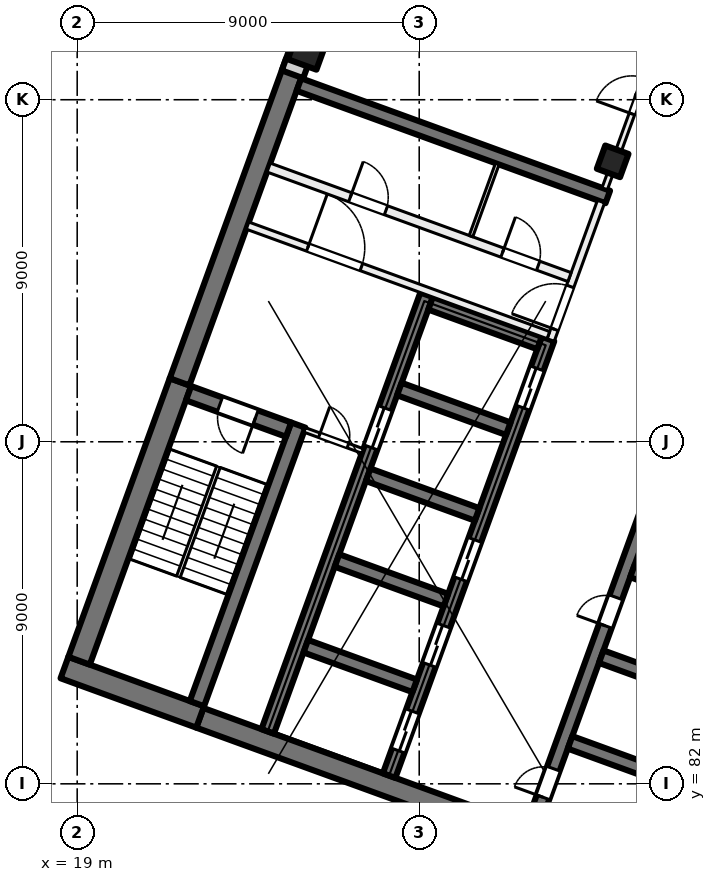
"""IFC4 building model, lengths in metres.
Left out: names, types, materials, properties, quantities, classifications, styles, units other than length and angle.
Written with IfcOpenShell. Run it as: python <this file> out.ifc"""

import sys

from ifc_helpers import new_model, si_unit, direction, frame, frame_2d, origin, origin_2d, place, context, subcontext, project, spatial, rectangle, extrude, element, fill, save


model = new_model("IFC4")
c1 = context("Model", 3, precision=1e-05, world=origin(), true_north=direction((0.0, 1.0)))
c2 = subcontext(c1, "Body", "Model", "MODEL_VIEW")
j1 = project(units=[si_unit("LENGTHUNIT", "METRE"), si_unit("PLANEANGLEUNIT", "RADIAN")], contexts=[c1])
p1 = place(None, origin())
s1 = spatial("IfcSite", under=j1, at=p1, CompositionType="ELEMENT")
p2 = place(p1, origin())
s2 = spatial("IfcBuilding", under=s1, at=p2, CompositionType="ELEMENT")
p3 = place(p2, frame((0.0, 0.0, 166.5)))
s3 = spatial("IfcBuildingStorey", under=s2, at=p3, CompositionType="ELEMENT", Elevation=166.5)
p4 = place(p3, frame((33.091, 98.379, 0.0), z_axis=(0.0, 0.0, 1.0), x_axis=(-0.342020143326, -0.939692620786, 0.0)))
e1 = element("IfcColumn", 1, at=p4, inside=s3, PredefinedType="COLUMN", context=c2, shape_type="SweptSolid", body=[
    extrude(rectangle(XDim=0.65, YDim=0.65, at=origin_2d()), origin(), (0.0, 0.0, 1.0), 4.0),
])
p5 = place(p3, frame((25.056, 101.303, 0.0), z_axis=(0.0, 0.0, 1.0), x_axis=(-0.342020143326, -0.939692620786, 0.0)))
e2 = element("IfcColumn", 2, at=p5, inside=s3, PredefinedType="COLUMN", context=c2, shape_type="SweptSolid", body=[
    extrude(rectangle(XDim=0.8, YDim=0.8, at=origin_2d()), origin(), (0.0, 0.0, 1.0), 4.0),
])
p6 = place(p3, frame((35.759, 78.811, 0.0), z_axis=(0.0, 0.0, 1.0), x_axis=(-0.939692894512, 0.342019391267, 0.0)))
e3 = element("IfcWall", 3, at=p6, inside=s3, PredefinedType="SHEAR", context=c2, shape_type="SweptSolid", body=[
    extrude(rectangle(XDim=14.4, YDim=0.55, at=frame_2d((7.2, 0.0))), origin(), (0.0, 0.0, 1.0), 4.0),
])
p7 = place(p3, frame((22.236, 83.76, 0.0), z_axis=(0.0, 0.0, 1.0), x_axis=(-0.939680822529, 0.342052557032, 0.0)))
e4 = element("IfcWall", 4, at=p7, inside=s3, PredefinedType="SHEAR", context=c2, shape_type="SweptSolid", body=[
    extrude(rectangle(XDim=3.8, YDim=0.6, at=frame_2d((1.9, 0.0))), origin(), (0.0, 0.0, 1.0), 4.0),
])
p8 = place(p3, frame((19.05, 85.239, 0.0), z_axis=(0.0, 0.0, 1.0), x_axis=(0.342016982193, 0.939693771338, 0.0)))
e5 = element("IfcWall", 5, at=p8, inside=s3, PredefinedType="SHEAR", context=c2, shape_type="SweptSolid", body=[
    extrude(rectangle(XDim=7.8, YDim=0.6, at=frame_2d((3.9, 0.0))), origin(), (0.0, 0.0, 1.0), 4.0),
])
p9 = place(p3, frame((21.694, 92.577, 0.0), z_axis=(0.0, 0.0, 1.0), x_axis=(0.342010253184, 0.939696220444, 0.0)))
e6 = element("IfcWall", 6, at=p9, inside=s3, PredefinedType="SHEAR", context=c2, shape_type="SweptSolid", body=[
    extrude(rectangle(XDim=8.95, YDim=0.55, at=frame_2d((4.475, 0.0))), origin(), (0.0, 0.0, 1.0), 4.0),
])
p10 = place(p3, frame((22.15, 84.11, 0.0), z_axis=(0.0, 0.0, 1.0), x_axis=(0.342016982193, 0.939693771338, 0.0)))
e7 = element("IfcWall", 7, at=p10, inside=s3, PredefinedType="SHEAR", context=c2, shape_type="SweptSolid", body=[
    extrude(rectangle(XDim=7.8, YDim=0.4, at=frame_2d((3.9, 0.0))), origin(), (0.0, 0.0, 1.0), 4.0),
])
p11 = place(p3, frame((24.562, 91.32, 0.0), z_axis=(0.0, 0.0, 1.0), x_axis=(-0.939717030584, 0.341953070509, 0.0)))
e8 = element("IfcWall", 8, at=p11, inside=s3, PredefinedType="SHEAR", context=c2, shape_type="SweptSolid", body=[
    extrude(rectangle(XDim=2.8, YDim=0.4, at=frame_2d((1.4, 0.0))), origin(), (0.0, 0.0, 1.0), 4.0),
])
p12 = place(p11, frame((0.925, 0.0, 0.0)))
e9 = element("IfcOpeningElement", 9, at=p12, cuts=e8, PredefinedType="OPENING", context=c2, shape_type="SweptSolid", body=[
    extrude(rectangle(XDim=1.0, YDim=2.1, at=frame_2d((0.5, 1.05))), frame((0.0, 0.21, 0.0), z_axis=(0.0, -1.0, 0.0), x_axis=(1.0, 0.0, 0.0)), (0.0, 0.0, 1.0), 0.42),
])
p13 = place(p3, frame((30.967, 80.848, 0.0), z_axis=(0.0, 0.0, 1.0), x_axis=(0.34201563943, 0.939694260058, 0.0)))
e10 = element("IfcWall", 10, at=p13, inside=s3, PredefinedType="SHEAR", context=c2, shape_type="SweptSolid", body=[
    extrude(rectangle(XDim=12.225, YDim=0.35, at=frame_2d((6.113, 0.0))), origin(), (0.0, 0.0, 1.0), 4.0),
])
p14 = place(p13, frame((0.85, 0.0, 0.0)))
e11 = element("IfcOpeningElement", 11, at=p14, cuts=e10, PredefinedType="OPENING", context=c2, shape_type="SweptSolid", body=[
    extrude(rectangle(XDim=0.8, YDim=2.1, at=frame_2d((0.4, 1.05))), frame((0.0, 0.185, 0.0), z_axis=(0.0, -1.0, 0.0), x_axis=(1.0, 0.0, 0.0)), (0.0, 0.0, 1.0), 0.37),
])
p15 = place(p13, frame((5.65, 0.0, 0.0)))
e12 = element("IfcOpeningElement", 12, at=p15, cuts=e10, PredefinedType="OPENING", context=c2, shape_type="SweptSolid", body=[
    extrude(rectangle(XDim=0.8, YDim=2.1, at=frame_2d((0.4, 1.05))), frame((0.0, 0.185, 0.0), z_axis=(0.0, -1.0, 0.0), x_axis=(1.0, 0.0, 0.0)), (0.0, 0.0, 1.0), 0.37),
])
p16 = place(p3, frame((34.835, 82.047, 0.0), z_axis=(0.0, 0.0, 1.0), x_axis=(-0.939683528043, 0.3420451244, 0.0)))
e13 = element("IfcWall", 13, at=p16, inside=s3, PredefinedType="SHEAR", context=c2, shape_type="SweptSolid", body=[
    extrude(rectangle(XDim=3.05, YDim=0.35, at=frame_2d((1.525, 0.0))), origin(), (0.0, 0.0, 1.0), 4.0),
])
p17 = place(p3, frame((35.656, 84.303, 0.0), z_axis=(0.0, 0.0, 1.0), x_axis=(-0.939709254651, 0.341974438698, 0.0)))
e14 = element("IfcWall", 14, at=p17, inside=s3, PredefinedType="SHEAR", context=c2, shape_type="SweptSolid", body=[
    extrude(rectangle(XDim=3.05, YDim=0.35, at=frame_2d((1.525, 0.0))), origin(), (0.0, 0.0, 1.0), 4.0),
])
p18 = place(p3, frame((36.477, 86.558, 0.0), z_axis=(0.0, 0.0, 1.0), x_axis=(-0.939683528043, 0.3420451244, 0.0)))
e15 = element("IfcWall", 15, at=p18, inside=s3, PredefinedType="SHEAR", context=c2, shape_type="SweptSolid", body=[
    extrude(rectangle(XDim=3.05, YDim=0.35, at=frame_2d((1.525, 0.0))), origin(), (0.0, 0.0, 1.0), 4.0),
])
p19 = place(p3, frame((27.208, 82.216, 0.0), z_axis=(0.0, 0.0, 1.0), x_axis=(0.34201563943, 0.939694260058, 0.0)))
e16 = element("IfcWall", 16, at=p19, inside=s3, PredefinedType="SHEAR", context=c2, shape_type="SweptSolid", body=[
    extrude(rectangle(XDim=12.225, YDim=0.35, at=frame_2d((6.113, 0.0))), origin(), (0.0, 0.0, 1.0), 4.0),
])
p20 = place(p19, frame((0.7, 0.0, 0.0)))
e17 = element("IfcOpeningElement", 17, at=p20, cuts=e16, PredefinedType="OPENING", context=c2, shape_type="SweptSolid", body=[
    extrude(rectangle(XDim=1.1, YDim=2.1, at=frame_2d((0.55, 1.05))), frame((0.0, 0.185, 0.0), z_axis=(0.0, -1.0, 0.0), x_axis=(1.0, 0.0, 0.0)), (0.0, 0.0, 1.0), 0.37),
])
p21 = place(p19, frame((3.1, 0.0, 0.0)))
e18 = element("IfcOpeningElement", 18, at=p21, cuts=e16, PredefinedType="OPENING", context=c2, shape_type="SweptSolid", body=[
    extrude(rectangle(XDim=1.1, YDim=2.1, at=frame_2d((0.55, 1.05))), frame((0.0, 0.185, 0.0), z_axis=(0.0, -1.0, 0.0), x_axis=(1.0, 0.0, 0.0)), (0.0, 0.0, 1.0), 0.37),
])
p22 = place(p19, frame((5.5, 0.0, 0.0)))
e19 = element("IfcOpeningElement", 19, at=p22, cuts=e16, PredefinedType="OPENING", context=c2, shape_type="SweptSolid", body=[
    extrude(rectangle(XDim=1.1, YDim=2.1, at=frame_2d((0.55, 1.05))), frame((0.0, 0.185, 0.0), z_axis=(0.0, -1.0, 0.0), x_axis=(1.0, 0.0, 0.0)), (0.0, 0.0, 1.0), 0.37),
])
p23 = place(p19, frame((10.3, 0.0, 0.0)))
e20 = element("IfcOpeningElement", 20, at=p23, cuts=e16, PredefinedType="OPENING", context=c2, shape_type="SweptSolid", body=[
    extrude(rectangle(XDim=1.1, YDim=2.1, at=frame_2d((0.55, 1.05))), frame((0.0, 0.185, 0.0), z_axis=(0.0, -1.0, 0.0), x_axis=(1.0, 0.0, 0.0)), (0.0, 0.0, 1.0), 0.37),
])
p24 = place(p3, frame((24.013, 83.379, 0.0), z_axis=(0.0, 0.0, 1.0), x_axis=(0.34201563943, 0.939694260058, 0.0)))
e21 = element("IfcWall", 21, at=p24, inside=s3, PredefinedType="SHEAR", context=c2, shape_type="SweptSolid", body=[
    extrude(rectangle(XDim=12.225, YDim=0.35, at=frame_2d((6.113, 0.0))), origin(), (0.0, 0.0, 1.0), 4.0),
])
p25 = place(p24, frame((7.95, 0.0, 0.0)))
e22 = element("IfcOpeningElement", 22, at=p25, cuts=e21, PredefinedType="OPENING", context=c2, shape_type="SweptSolid", body=[
    extrude(rectangle(XDim=1.1, YDim=2.1, at=frame_2d((0.55, 1.05))), frame((0.0, 0.185, 0.0), z_axis=(0.0, -1.0, 0.0), x_axis=(1.0, 0.0, 0.0)), (0.0, 0.0, 1.0), 0.37),
])
for number, where, z_axis, x_axis in (
    (23, (27.881, 84.578, 0.0), (0.0, 0.0, 1.0), (-0.94, 0.342, 0.0)),
    (24, (28.702, 86.833, 0.0), (0.0, 0.0, 1.0), (-0.94, 0.342, 0.0)),
    (25, (29.523, 89.089, 0.0), (0.0, 0.0, 1.0), (-0.94, 0.342, 0.0)),
):
    element("IfcWall", number, at=place(p3, frame(where, z_axis=z_axis, x_axis=x_axis)), inside=s3, PredefinedType="SHEAR", context=c2, shape_type="SweptSolid", body=[
        extrude(rectangle(XDim=3.05, YDim=0.35, at=frame_2d((1.525, 0.0))), origin(), (0.0, 0.0, 1.0), 4.0),
    ])
p26 = place(p3, frame((30.344, 91.344, 0.0), z_axis=(0.0, 0.0, 1.0), x_axis=(-0.939709254651, 0.341974438698, 0.0)))
e26 = element("IfcWall", 26, at=p26, inside=s3, PredefinedType="SHEAR", context=c2, shape_type="SweptSolid", body=[
    extrude(rectangle(XDim=3.05, YDim=0.35, at=frame_2d((1.525, 0.0))), origin(), (0.0, 0.0, 1.0), 4.0),
])
p27 = place(p3, frame((31.165, 93.599, 0.0), z_axis=(0.0, 0.0, 1.0), x_axis=(-0.939683528043, 0.3420451244, 0.0)))
e27 = element("IfcWall", 27, at=p27, inside=s3, PredefinedType="SHEAR", context=c2, shape_type="SweptSolid", body=[
    extrude(rectangle(XDim=3.05, YDim=0.35, at=frame_2d((1.525, 0.0))), origin(), (0.0, 0.0, 1.0), 4.0),
])
p28 = place(p3, frame((32.962, 97.441, 0.0), z_axis=(0.0, 0.0, 1.0), x_axis=(-0.939689545667, 0.342028592028, 0.0)))
e28 = element("IfcWall", 28, at=p28, inside=s3, PredefinedType="SHEAR", context=c2, shape_type="SweptSolid", body=[
    extrude(rectangle(XDim=8.65, YDim=0.35, at=frame_2d((4.325, 0.0))), origin(), (0.0, 0.0, 1.0), 4.0),
])
p29 = place(p3, frame((24.666, 100.669, 0.0), z_axis=(0.0, 0.0, 1.0), x_axis=(0.34201964167, 0.939692803373, 0.0)))
e29 = element("IfcWall", 29, at=p29, inside=s3, PredefinedType="SOLIDWALL", context=c2, shape_type="SweptSolid", body=[
    extrude(rectangle(XDim=32.884, YDim=0.6, at=frame_2d((16.442, 0.0))), origin(), (0.0, 0.0, 1.0), 3.625),
])
p30 = place(p29, frame((1.48, 0.0, 0.9)))
e30 = element("IfcOpeningElement", 30, at=p30, cuts=e29, PredefinedType="OPENING", context=c2, shape_type="SweptSolid", body=[
    extrude(rectangle(XDim=3.0, YDim=2.4, at=frame_2d((1.5, 1.2))), frame((0.0, 0.31, 0.0), z_axis=(0.0, -1.0, 0.0), x_axis=(1.0, 0.0, 0.0)), (0.0, 0.0, 1.0), 0.62),
])
p31 = place(p29, frame((5.98, 0.0, 0.9)))
e31 = element("IfcOpeningElement", 31, at=p31, cuts=e29, PredefinedType="OPENING", context=c2, shape_type="SweptSolid", body=[
    extrude(rectangle(XDim=3.0, YDim=2.4, at=frame_2d((1.5, 1.2))), frame((0.0, 0.31, 0.0), z_axis=(0.0, -1.0, 0.0), x_axis=(1.0, 0.0, 0.0)), (0.0, 0.0, 1.0), 0.62),
])
p32 = place(p29, frame((10.48, 0.0, 0.9)))
e32 = element("IfcOpeningElement", 32, at=p32, cuts=e29, PredefinedType="OPENING", context=c2, shape_type="SweptSolid", body=[
    extrude(rectangle(XDim=3.0, YDim=2.4, at=frame_2d((1.5, 1.2))), frame((0.0, 0.31, 0.0), z_axis=(0.0, -1.0, 0.0), x_axis=(1.0, 0.0, 0.0)), (0.0, 0.0, 1.0), 0.62),
])
p33 = place(p29, frame((15.58, 0.0, 0.0)))
e33 = element("IfcOpeningElement", 33, at=p33, cuts=e29, PredefinedType="OPENING", context=c2, shape_type="SweptSolid", body=[
    extrude(rectangle(XDim=1.8, YDim=2.4, at=frame_2d((0.9, 1.2))), frame((0.0, 0.31, 0.0), z_axis=(0.0, -1.0, 0.0), x_axis=(1.0, 0.0, 0.0)), (0.0, 0.0, 1.0), 0.62),
])
p34 = place(p29, frame((19.48, 0.0, 0.9)))
e34 = element("IfcOpeningElement", 34, at=p34, cuts=e29, PredefinedType="OPENING", context=c2, shape_type="SweptSolid", body=[
    extrude(rectangle(XDim=3.0, YDim=2.4, at=frame_2d((1.5, 1.2))), frame((0.0, 0.31, 0.0), z_axis=(0.0, -1.0, 0.0), x_axis=(1.0, 0.0, 0.0)), (0.0, 0.0, 1.0), 0.62),
])
p35 = place(p29, frame((23.98, 0.0, 0.9)))
e35 = element("IfcOpeningElement", 35, at=p35, cuts=e29, PredefinedType="OPENING", context=c2, shape_type="SweptSolid", body=[
    extrude(rectangle(XDim=3.0, YDim=2.4, at=frame_2d((1.5, 1.2))), frame((0.0, 0.31, 0.0), z_axis=(0.0, -1.0, 0.0), x_axis=(1.0, 0.0, 0.0)), (0.0, 0.0, 1.0), 0.62),
])
p36 = place(p29, frame((29.08, 0.0, 0.0)))
e36 = element("IfcOpeningElement", 36, at=p36, cuts=e29, PredefinedType="OPENING", context=c2, shape_type="SweptSolid", body=[
    extrude(rectangle(XDim=1.8, YDim=2.4, at=frame_2d((0.9, 1.2))), frame((0.0, 0.31, 0.0), z_axis=(0.0, -1.0, 0.0), x_axis=(1.0, 0.0, 0.0)), (0.0, 0.0, 1.0), 0.62),
])
p37 = place(p3, frame((31.459, 93.678, 0.0), z_axis=(0.0, 0.0, 1.0), x_axis=(0.341985870128, 0.939705094502, 0.0)))
e37 = element("IfcWall", 37, at=p37, inside=s3, PredefinedType="PARTITIONING", context=c2, shape_type="SweptSolid", body=[
    extrude(rectangle(XDim=3.875, YDim=0.2, at=frame_2d((1.938, 0.0))), origin(), (0.0, 0.0, 1.0), 3.625),
])
p38 = place(p37, frame((0.3, 0.0, 0.0)))
e38 = element("IfcOpeningElement", 38, at=p38, cuts=e37, PredefinedType="OPENING", context=c2, shape_type="SweptSolid", body=[
    extrude(rectangle(XDim=1.2, YDim=2.1, at=frame_2d((0.6, 1.05))), frame((0.0, 0.11, 0.0), z_axis=(0.0, -1.0, 0.0), x_axis=(1.0, 0.0, 0.0)), (0.0, 0.0, 1.0), 0.22),
])
p39 = place(p3, frame((23.483, 96.688, 0.0), z_axis=(0.0, 0.0, 1.0), x_axis=(0.939691007314, -0.342024576271, 0.0)))
e39 = element("IfcWall", 39, at=p39, inside=s3, PredefinedType="PARTITIONING", context=c2, shape_type="SweptSolid", body=[
    extrude(rectangle(XDim=8.425, YDim=0.2, at=frame_2d((4.212, 0.0))), origin(), (0.0, 0.0, 1.0), 3.625),
])
p40 = place(p39, frame((1.688, 0.0, 0.0)))
e40 = element("IfcOpeningElement", 40, at=p40, cuts=e39, PredefinedType="OPENING", context=c2, shape_type="SweptSolid", body=[
    extrude(rectangle(XDim=1.5, YDim=2.1, at=frame_2d((0.75, 1.05))), frame((0.0, 0.11, 0.0), z_axis=(0.0, -1.0, 0.0), x_axis=(1.0, 0.0, 0.0)), (0.0, 0.0, 1.0), 0.22),
])
p41 = place(p3, frame((24.039, 98.215, 0.0), z_axis=(0.0, 0.0, 1.0), x_axis=(0.939687617333, -0.342033889887, 0.0)))
e41 = element("IfcWall", 41, at=p41, inside=s3, PredefinedType="PARTITIONING", context=c2, shape_type="SweptSolid", body=[
    extrude(rectangle(XDim=8.425, YDim=0.25, at=frame_2d((4.212, 0.0))), origin(), (0.0, 0.0, 1.0), 3.625),
])
p42 = place(p41, frame((6.548, 0.0, 0.0)))
e42 = element("IfcOpeningElement", 42, at=p42, cuts=e41, PredefinedType="OPENING", context=c2, shape_type="SweptSolid", body=[
    extrude(rectangle(XDim=1.0, YDim=2.1, at=frame_2d((0.5, 1.05))), frame((0.0, 0.135, 0.0), z_axis=(0.0, -1.0, 0.0), x_axis=(1.0, 0.0, 0.0)), (0.0, 0.0, 1.0), 0.27),
])
p43 = place(p41, frame((2.285, 0.0, 0.0)))
e43 = element("IfcOpeningElement", 43, at=p43, cuts=e41, PredefinedType="OPENING", context=c2, shape_type="SweptSolid", body=[
    extrude(rectangle(XDim=1.0, YDim=2.1, at=frame_2d((0.5, 1.05))), frame((0.0, 0.135, 0.0), z_axis=(0.0, -1.0, 0.0), x_axis=(1.0, 0.0, 0.0)), (0.0, 0.0, 1.0), 0.27),
])
p44 = place(p3, frame((24.985, 91.312, 0.0), z_axis=(0.0, 0.0, 1.0), x_axis=(0.939705651352, -0.341984340019, 0.0)))
e44 = element("IfcWall", 44, at=p44, inside=s3, PredefinedType="PARTITIONING", context=c2, shape_type="SweptSolid", body=[
    extrude(rectangle(XDim=1.625, YDim=0.125, at=frame_2d((0.812, 0.0))), origin(), (0.0, 0.0, 1.0), 3.625),
])
p45 = place(p44, frame((0.413, 0.0, 0.0)))
e45 = element("IfcOpeningElement", 45, at=p45, cuts=e44, PredefinedType="OPENING", context=c2, shape_type="SweptSolid", body=[
    extrude(rectangle(XDim=0.8, YDim=2.1, at=frame_2d((0.4, 1.05))), frame((0.0, 0.073, 0.0), z_axis=(0.0, -1.0, 0.0), x_axis=(1.0, 0.0, 0.0)), (0.0, 0.0, 1.0), 0.145),
])
p46 = place(p3, frame((29.362, 96.41, 0.0), z_axis=(0.0, 0.0, 1.0), x_axis=(0.342043138314, 0.939684250976, 0.0)))
e46 = element("IfcWall", 46, at=p46, inside=s3, PredefinedType="PARTITIONING", context=c2, shape_type="SweptSolid", body=[
    extrude(rectangle(XDim=2.025, YDim=0.1, at=frame_2d((1.012, 0.0))), origin(), (0.0, 0.0, 1.0), 3.625),
])
p47 = place(p3, frame((26.736, 105.48, 0.0), z_axis=(0.0, 0.0, 1.0), x_axis=(0.939695108427, -0.342013308511, 0.0)))
e47 = element("IfcWall", 47, at=p47, inside=s3, PredefinedType="PARTITIONING", context=c2, shape_type="SweptSolid", body=[
    extrude(rectangle(XDim=16.9, YDim=0.15, at=frame_2d((8.45, 0.0))), origin(), (0.0, 0.0, 1.0), 3.625),
])
p48 = place(p3, frame((32.881, 97.657, 0.0), z_axis=(0.0, 0.0, 1.0), x_axis=(0.341981688871, 0.939706616172, 0.0)))
e48 = element("IfcWall", 48, at=p48, inside=s3, PredefinedType="PARTITIONING", context=c2, shape_type="SweptSolid", body=[
    extrude(rectangle(XDim=5.175, YDim=0.15, at=frame_2d((2.587, 0.0))), origin(), (0.0, 0.0, 1.0), 3.625),
])
p49 = place(p48, frame((2.098, 0.0, 0.0)))
e49 = element("IfcOpeningElement", 49, at=p49, cuts=e48, PredefinedType="OPENING", context=c2, shape_type="SweptSolid", body=[
    extrude(rectangle(XDim=1.0, YDim=2.1, at=frame_2d((0.5, 1.05))), frame((0.0, 0.085, 0.0), z_axis=(0.0, -1.0, 0.0), x_axis=(1.0, 0.0, 0.0)), (0.0, 0.0, 1.0), 0.17),
])
p50 = place(p20, origin())
e50 = element("IfcDoor", 50, at=p50, inside=s3, OperationType="DOUBLE_DOOR_SLIDING", PredefinedType="DOOR", context=c2, shape_type="SweptSolid", body=[
    extrude(rectangle(XDim=1.1, YDim=2.1, at=frame_2d((0.55, 1.05))), frame((0.0, 0.025, 0.0), z_axis=(0.0, -1.0, 0.0), x_axis=(1.0, 0.0, 0.0)), (0.0, 0.0, 1.0), 0.05),
])
fill(e17, e50)
p51 = place(p21, origin())
e51 = element("IfcDoor", 51, at=p51, inside=s3, OperationType="DOUBLE_DOOR_SLIDING", PredefinedType="DOOR", context=c2, shape_type="SweptSolid", body=[
    extrude(rectangle(XDim=1.1, YDim=2.1, at=frame_2d((0.55, 1.05))), frame((0.0, 0.025, 0.0), z_axis=(0.0, -1.0, 0.0), x_axis=(1.0, 0.0, 0.0)), (0.0, 0.0, 1.0), 0.05),
])
fill(e18, e51)
p52 = place(p22, origin())
e52 = element("IfcDoor", 52, at=p52, inside=s3, OperationType="DOUBLE_DOOR_SLIDING", PredefinedType="DOOR", context=c2, shape_type="SweptSolid", body=[
    extrude(rectangle(XDim=1.1, YDim=2.1, at=frame_2d((0.55, 1.05))), frame((0.0, 0.025, 0.0), z_axis=(0.0, -1.0, 0.0), x_axis=(1.0, 0.0, 0.0)), (0.0, 0.0, 1.0), 0.05),
])
fill(e19, e52)
p53 = place(p23, origin())
e53 = element("IfcDoor", 53, at=p53, inside=s3, OperationType="DOUBLE_DOOR_SLIDING", PredefinedType="DOOR", context=c2, shape_type="SweptSolid", body=[
    extrude(rectangle(XDim=1.1, YDim=2.1, at=frame_2d((0.55, 1.05))), frame((0.0, 0.025, 0.0), z_axis=(0.0, -1.0, 0.0), x_axis=(1.0, 0.0, 0.0)), (0.0, 0.0, 1.0), 0.05),
])
fill(e20, e53)
p54 = place(p14, origin())
e54 = element("IfcDoor", 54, at=p54, inside=s3, OperationType="SINGLE_SWING_LEFT", PredefinedType="DOOR", context=c2, shape_type="SweptSolid", body=[
    extrude(rectangle(XDim=0.8, YDim=2.1, at=frame_2d((0.4, 1.05))), frame((0.0, 0.025, 0.0), z_axis=(0.0, -1.0, 0.0), x_axis=(1.0, 0.0, 0.0)), (0.0, 0.0, 1.0), 0.05),
])
fill(e11, e54)
p55 = place(p15, origin())
e55 = element("IfcDoor", 55, at=p55, inside=s3, OperationType="SINGLE_SWING_RIGHT", PredefinedType="DOOR", context=c2, shape_type="SweptSolid", body=[
    extrude(rectangle(XDim=0.8, YDim=2.1, at=frame_2d((0.4, 1.05))), frame((0.0, 0.025, 0.0), z_axis=(0.0, -1.0, 0.0), x_axis=(1.0, 0.0, 0.0)), (0.0, 0.0, 1.0), 0.05),
])
fill(e12, e55)
p56 = place(p38, origin())
e56 = element("IfcDoor", 56, at=p56, inside=s3, OperationType="DOUBLE_DOOR_SINGLE_SWING", PredefinedType="DOOR", context=c2, shape_type="SweptSolid", body=[
    extrude(rectangle(XDim=1.2, YDim=2.1, at=frame_2d((0.6, 1.05))), frame((0.0, 0.025, 0.0), z_axis=(0.0, -1.0, 0.0), x_axis=(1.0, 0.0, 0.0)), (0.0, 0.0, 1.0), 0.05),
])
fill(e38, e56)
p57 = place(p40, origin())
e57 = element("IfcDoor", 57, at=p57, inside=s3, OperationType="DOUBLE_DOOR_SINGLE_SWING", PredefinedType="DOOR", context=c2, shape_type="SweptSolid", body=[
    extrude(rectangle(XDim=1.5, YDim=2.1, at=frame_2d((0.75, 1.05))), frame((0.0, 0.025, 0.0), z_axis=(0.0, -1.0, 0.0), x_axis=(1.0, 0.0, 0.0)), (0.0, 0.0, 1.0), 0.05),
])
fill(e40, e57)
p58 = place(p12, origin())
e58 = element("IfcDoor", 58, at=p58, inside=s3, OperationType="SINGLE_SWING_LEFT", PredefinedType="DOOR", context=c2, shape_type="SweptSolid", body=[
    extrude(rectangle(XDim=1.0, YDim=2.1, at=frame_2d((0.5, 1.05))), frame((0.0, 0.025, 0.0), z_axis=(0.0, -1.0, 0.0), x_axis=(1.0, 0.0, 0.0)), (0.0, 0.0, 1.0), 0.05),
])
fill(e9, e58)
p59 = place(p45, origin())
e59 = element("IfcDoor", 59, at=p59, inside=s3, OperationType="SINGLE_SWING_RIGHT", PredefinedType="DOOR", context=c2, shape_type="SweptSolid", body=[
    extrude(rectangle(XDim=0.8, YDim=2.1, at=frame_2d((0.4, 1.05))), frame((0.0, 0.025, 0.0), z_axis=(0.0, -1.0, 0.0), x_axis=(1.0, 0.0, 0.0)), (0.0, 0.0, 1.0), 0.05),
])
fill(e45, e59)
p60 = place(p42, origin())
e60 = element("IfcDoor", 60, at=p60, inside=s3, OperationType="SINGLE_SWING_LEFT", PredefinedType="DOOR", context=c2, shape_type="SweptSolid", body=[
    extrude(rectangle(XDim=1.0, YDim=2.1, at=frame_2d((0.5, 1.05))), frame((0.0, 0.025, 0.0), z_axis=(0.0, -1.0, 0.0), x_axis=(1.0, 0.0, 0.0)), (0.0, 0.0, 1.0), 0.05),
])
fill(e42, e60)
p61 = place(p43, origin())
e61 = element("IfcDoor", 61, at=p61, inside=s3, OperationType="SINGLE_SWING_RIGHT", PredefinedType="DOOR", context=c2, shape_type="SweptSolid", body=[
    extrude(rectangle(XDim=1.0, YDim=2.1, at=frame_2d((0.5, 1.05))), frame((0.0, 0.025, 0.0), z_axis=(0.0, -1.0, 0.0), x_axis=(1.0, 0.0, 0.0)), (0.0, 0.0, 1.0), 0.05),
])
fill(e43, e61)
p62 = place(p25, origin())
e62 = element("IfcDoor", 62, at=p62, inside=s3, OperationType="DOUBLE_DOOR_SLIDING", PredefinedType="DOOR", context=c2, shape_type="SweptSolid", body=[
    extrude(rectangle(XDim=1.1, YDim=2.1, at=frame_2d((0.55, 1.05))), frame((0.0, 0.025, 0.0), z_axis=(0.0, -1.0, 0.0), x_axis=(1.0, 0.0, 0.0)), (0.0, 0.0, 1.0), 0.05),
])
fill(e22, e62)
p63 = place(p49, origin())
e63 = element("IfcDoor", 63, at=p63, inside=s3, OperationType="SINGLE_SWING_LEFT", PredefinedType="DOOR", context=c2, shape_type="SweptSolid", body=[
    extrude(rectangle(XDim=1.0, YDim=2.1, at=frame_2d((0.5, 1.05))), frame((0.0, 0.025, 0.0), z_axis=(0.0, -1.0, 0.0), x_axis=(1.0, 0.0, 0.0)), (0.0, 0.0, 1.0), 0.05),
])
fill(e49, e63)
save(model, sys.argv[1])
